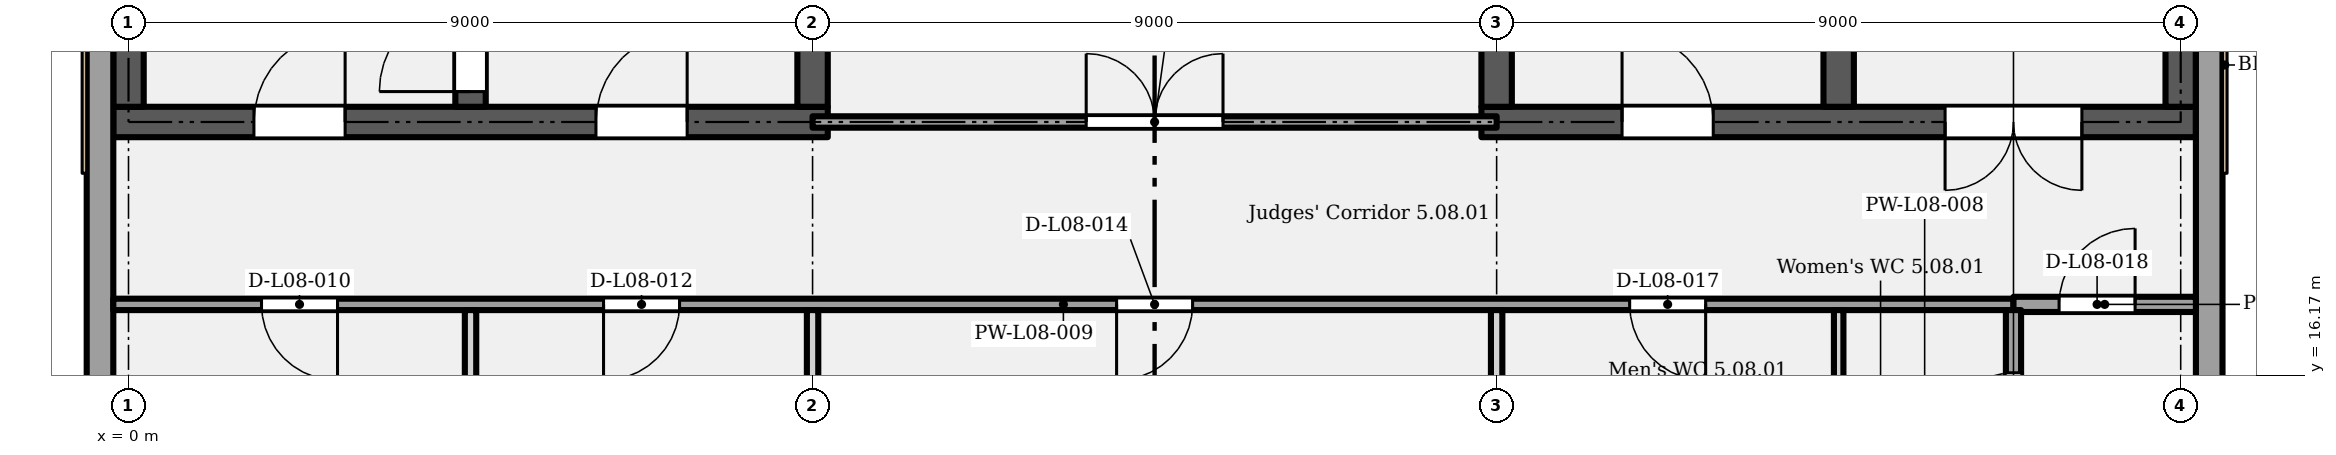
"""IFC4 building model, lengths in metres.
Left out: names, types, materials, properties, quantities, classifications, styles, units other than length and angle.
Written with IfcOpenShell. Run it as: python <this file> out.ifc"""

import sys

from ifc_helpers import new_model, si_unit, direction, frame, frame_2d, origin, place, context, subcontext, project, spatial, rectangle, extrude, element, fill, save


model = new_model("IFC4")
c1 = context("Model", 3, precision=1e-05, world=origin(), true_north=direction((0.0, 1.0)))
c2 = subcontext(c1, "Body", "Model", "MODEL_VIEW")
j1 = project(units=[si_unit("LENGTHUNIT", "METRE"), si_unit("PLANEANGLEUNIT", "RADIAN")], contexts=[c1])
p1 = place(None, origin())
s1 = spatial("IfcSite", under=j1, at=p1, CompositionType="ELEMENT")
p2 = place(p1, origin())
s2 = spatial("IfcBuilding", under=s1, at=p2, CompositionType="ELEMENT")
p3 = place(p2, frame((0.0, 0.0, 44.4)))
s3 = spatial("IfcBuildingStorey", under=s2, at=p3, CompositionType="ELEMENT", Elevation=44.4)
p4 = place(p3, frame((-0.2, 19.5, 0.0), z_axis=(0.0, 0.0, 1.0), x_axis=(1.0, 0.0, 0.0)))
e1 = element("IfcWall", 1, at=p4, inside=s3, PredefinedType="SHEAR", context=c2, shape_type="SweptSolid", body=[
    extrude(rectangle(XDim=9.4, YDim=0.4, at=frame_2d((4.7, 0.0))), origin(), (0.0, 0.0, 1.0), 4.25),
])
p5 = place(p4, frame((1.85, 0.0, 0.0)))
e2 = element("IfcOpeningElement", 2, at=p5, cuts=e1, PredefinedType="OPENING", context=c2, shape_type="SweptSolid", body=[
    extrude(rectangle(XDim=1.2, YDim=2.1, at=frame_2d((0.6, 1.05))), frame((0.0, 0.21, 0.0), z_axis=(0.0, -1.0, 0.0), x_axis=(1.0, 0.0, 0.0)), (0.0, 0.0, 1.0), 0.42),
])
p6 = place(p4, frame((6.35, 0.0, 0.0)))
e3 = element("IfcOpeningElement", 3, at=p6, cuts=e1, PredefinedType="OPENING", context=c2, shape_type="SweptSolid", body=[
    extrude(rectangle(XDim=1.2, YDim=2.1, at=frame_2d((0.6, 1.05))), frame((0.0, 0.21, 0.0), z_axis=(0.0, -1.0, 0.0), x_axis=(1.0, 0.0, 0.0)), (0.0, 0.0, 1.0), 0.42),
])
p7 = place(p3, frame((17.8, 19.5, 0.0), z_axis=(0.0, 0.0, 1.0), x_axis=(1.0, 0.0, 0.0)))
e4 = element("IfcWall", 4, at=p7, inside=s3, PredefinedType="SHEAR", context=c2, shape_type="SweptSolid", body=[
    extrude(rectangle(XDim=9.4, YDim=0.4, at=frame_2d((4.7, 0.0))), origin(), (0.0, 0.0, 1.0), 4.25),
])
p8 = place(p7, frame((1.85, 0.0, 0.0)))
e5 = element("IfcOpeningElement", 5, at=p8, cuts=e4, PredefinedType="OPENING", context=c2, shape_type="SweptSolid", body=[
    extrude(rectangle(XDim=1.2, YDim=2.1, at=frame_2d((0.6, 1.05))), frame((0.0, 0.21, 0.0), z_axis=(0.0, -1.0, 0.0), x_axis=(1.0, 0.0, 0.0)), (0.0, 0.0, 1.0), 0.42),
])
p9 = place(p7, frame((7.9, 0.0, 0.0), z_axis=(0.0, 0.0, 1.0), x_axis=(-1.0, 0.0, 0.0)))
e6 = element("IfcOpeningElement", 6, at=p9, cuts=e4, PredefinedType="OPENING", context=c2, shape_type="SweptSolid", body=[
    extrude(rectangle(XDim=1.8, YDim=2.1, at=frame_2d((0.9, 1.05))), frame((0.0, 0.21, 0.0), z_axis=(0.0, -1.0, 0.0), x_axis=(1.0, 0.0, 0.0)), (0.0, 0.0, 1.0), 0.42),
])
p10 = place(p3, frame((0.0, 19.7, 0.0), z_axis=(0.0, 0.0, 1.0), x_axis=(0.0, 1.0, 0.0)))
e7 = element("IfcWall", 7, at=p10, inside=s3, PredefinedType="SHEAR", context=c2, shape_type="SweptSolid", body=[
    extrude(rectangle(XDim=8.35, YDim=0.4, at=frame_2d((4.175, 0.0))), origin(), (0.0, 0.0, 1.0), 4.25),
])
p11 = place(p3, frame((4.5, 19.7, 0.0), z_axis=(0.0, 0.0, 1.0), x_axis=(0.0, 1.0, 0.0)))
e8 = element("IfcWall", 8, at=p11, inside=s3, PredefinedType="SHEAR", context=c2, shape_type="SweptSolid", body=[
    extrude(rectangle(XDim=8.6, YDim=0.4, at=frame_2d((4.3, 0.0))), origin(), (0.0, 0.0, 1.0), 4.25),
])
p12 = place(p11, frame((0.2, 0.0, 0.0)))
e9 = element("IfcOpeningElement", 9, at=p12, cuts=e8, PredefinedType="OPENING", context=c2, shape_type="SweptSolid", body=[
    extrude(rectangle(XDim=1.2, YDim=2.1, at=frame_2d((0.6, 1.05))), frame((0.0, 0.21, 0.0), z_axis=(0.0, -1.0, 0.0), x_axis=(1.0, 0.0, 0.0)), (0.0, 0.0, 1.0), 0.42),
])
for number, where, z_axis, x_axis in (
    (10, (9.0, 19.7, 0.0), (0.0, 0.0, 1.0), (0.0, 1.0, 0.0)),
    (11, (18.0, 19.7, 0.0), (0.0, 0.0, 1.0), (0.0, 1.0, 0.0)),
):
    element("IfcWall", number, at=place(p3, frame(where, z_axis=z_axis, x_axis=x_axis)), inside=s3, PredefinedType="SHEAR", context=c2, shape_type="SweptSolid", body=[
        extrude(rectangle(XDim=8.35, YDim=0.4, at=frame_2d((4.175, 0.0))), origin(), (0.0, 0.0, 1.0), 4.25),
    ])
p13 = place(p3, frame((22.5, 19.7, 0.0), z_axis=(0.0, 0.0, 1.0), x_axis=(0.0, 1.0, 0.0)))
e12 = element("IfcWall", 12, at=p13, inside=s3, PredefinedType="SHEAR", context=c2, shape_type="SweptSolid", body=[
    extrude(rectangle(XDim=8.6, YDim=0.4, at=frame_2d((4.3, 0.0))), origin(), (0.0, 0.0, 1.0), 4.25),
])
p14 = place(p3, frame((27.0, 19.7, 0.0), z_axis=(0.0, 0.0, 1.0), x_axis=(0.0, 1.0, 0.0)))
e13 = element("IfcWall", 13, at=p14, inside=s3, PredefinedType="SHEAR", context=c2, shape_type="SweptSolid", body=[
    extrude(rectangle(XDim=8.35, YDim=0.4, at=frame_2d((4.175, 0.0))), origin(), (0.0, 0.0, 1.0), 4.25),
])
p15 = place(p3, frame((27.375, 15.188, 0.0), z_axis=(0.0, 0.0, 1.0), x_axis=(0.0, 1.0, 0.0)))
e14 = element("IfcWall", 14, at=p15, inside=s3, PredefinedType="SOLIDWALL", context=c2, shape_type="SweptSolid", body=[
    extrude(rectangle(XDim=12.863, YDim=0.35, at=frame_2d((6.431, 0.0))), origin(), (0.0, 0.0, 1.0), 4.25),
])
p16 = place(p3, frame((-0.375, 14.325, 0.0), z_axis=(0.0, 0.0, 1.0), x_axis=(0.0, 1.0, 0.0)))
e15 = element("IfcWall", 15, at=p16, inside=s3, PredefinedType="SOLIDWALL", context=c2, shape_type="SweptSolid", body=[
    extrude(rectangle(XDim=13.725, YDim=0.35, at=frame_2d((6.863, 0.0))), origin(), (0.0, 0.0, 1.0), 4.25),
])
p17 = place(p3, frame((-0.2, 17.1, 0.0), z_axis=(0.0, 0.0, 1.0), x_axis=(1.0, 0.0, 0.0)))
e16 = element("IfcWall", 16, at=p17, inside=s3, PredefinedType="PARTITIONING", context=c2, shape_type="SweptSolid", body=[
    extrude(rectangle(XDim=25.0, YDim=0.15, at=frame_2d((12.5, 0.0))), origin(), (0.0, 0.0, 1.0), 4.25),
])
p18 = place(p17, frame((2.95, 0.0, 0.0), z_axis=(0.0, 0.0, 1.0), x_axis=(-1.0, 0.0, 0.0)))
e17 = element("IfcOpeningElement", 17, at=p18, cuts=e16, PredefinedType="OPENING", context=c2, shape_type="SweptSolid", body=[
    extrude(rectangle(XDim=1.0, YDim=2.1, at=frame_2d((0.5, 1.05))), frame((0.0, 0.085, 0.0), z_axis=(0.0, -1.0, 0.0), x_axis=(1.0, 0.0, 0.0)), (0.0, 0.0, 1.0), 0.17),
])
p19 = place(p17, frame((7.45, 0.0, 0.0), z_axis=(0.0, 0.0, 1.0), x_axis=(-1.0, 0.0, 0.0)))
e18 = element("IfcOpeningElement", 18, at=p19, cuts=e16, PredefinedType="OPENING", context=c2, shape_type="SweptSolid", body=[
    extrude(rectangle(XDim=1.0, YDim=2.1, at=frame_2d((0.5, 1.05))), frame((0.0, 0.085, 0.0), z_axis=(0.0, -1.0, 0.0), x_axis=(1.0, 0.0, 0.0)), (0.0, 0.0, 1.0), 0.17),
])
p20 = place(p17, frame((14.2, 0.0, 0.0), z_axis=(0.0, 0.0, 1.0), x_axis=(-1.0, 0.0, 0.0)))
e19 = element("IfcOpeningElement", 19, at=p20, cuts=e16, PredefinedType="OPENING", context=c2, shape_type="SweptSolid", body=[
    extrude(rectangle(XDim=1.0, YDim=2.1, at=frame_2d((0.5, 1.05))), frame((0.0, 0.085, 0.0), z_axis=(0.0, -1.0, 0.0), x_axis=(1.0, 0.0, 0.0)), (0.0, 0.0, 1.0), 0.17),
])
p21 = place(p17, frame((20.95, 0.0, 0.0), z_axis=(0.0, 0.0, 1.0), x_axis=(-1.0, 0.0, 0.0)))
e20 = element("IfcOpeningElement", 20, at=p21, cuts=e16, PredefinedType="OPENING", context=c2, shape_type="SweptSolid", body=[
    extrude(rectangle(XDim=1.0, YDim=2.1, at=frame_2d((0.5, 1.05))), frame((0.0, 0.085, 0.0), z_axis=(0.0, -1.0, 0.0), x_axis=(1.0, 0.0, 0.0)), (0.0, 0.0, 1.0), 0.17),
])
p22 = place(p3, frame((24.8, 17.1, 0.0), z_axis=(0.0, 0.0, 1.0), x_axis=(1.0, 0.0, 0.0)))
e21 = element("IfcWall", 21, at=p22, inside=s3, PredefinedType="PARTITIONING", context=c2, shape_type="SweptSolid", body=[
    extrude(rectangle(XDim=2.4, YDim=0.2, at=frame_2d((1.2, 0.0))), origin(), (0.0, 0.0, 1.0), 4.25),
])
p23 = place(p22, frame((0.6, 0.0, 0.0)))
e22 = element("IfcOpeningElement", 22, at=p23, cuts=e21, PredefinedType="OPENING", context=c2, shape_type="SweptSolid", body=[
    extrude(rectangle(XDim=1.0, YDim=2.1, at=frame_2d((0.5, 1.05))), frame((0.0, 0.11, 0.0), z_axis=(0.0, -1.0, 0.0), x_axis=(1.0, 0.0, 0.0)), (0.0, 0.0, 1.0), 0.22),
])
p24 = place(p3, frame((9.0, 19.5, 0.0), z_axis=(0.0, 0.0, 1.0), x_axis=(1.0, 0.0, 0.0)))
e23 = element("IfcWall", 23, at=p24, inside=s3, PredefinedType="PARTITIONING", context=c2, shape_type="SweptSolid", body=[
    extrude(rectangle(XDim=9.0, YDim=0.15, at=frame_2d((4.5, 0.0))), origin(), (0.0, 0.0, 1.0), 4.25),
])
p25 = place(p24, frame((3.6, 0.0, 0.0)))
e24 = element("IfcOpeningElement", 24, at=p25, cuts=e23, PredefinedType="OPENING", context=c2, shape_type="SweptSolid", body=[
    extrude(rectangle(XDim=1.8, YDim=2.1, at=frame_2d((0.9, 1.05))), frame((0.0, 0.085, 0.0), z_axis=(0.0, -1.0, 0.0), x_axis=(1.0, 0.0, 0.0)), (0.0, 0.0, 1.0), 0.17),
])
p26 = place(p3, frame((4.5, 12.0, 0.0), z_axis=(0.0, 0.0, 1.0), x_axis=(0.0, 1.0, 0.0)))
e25 = element("IfcWall", 25, at=p26, inside=s3, PredefinedType="PARTITIONING", context=c2, shape_type="SweptSolid", body=[
    extrude(rectangle(XDim=5.025, YDim=0.15, at=frame_2d((2.512, 0.0))), origin(), (0.0, 0.0, 1.0), 4.25),
])
for number, where, z_axis, x_axis in (
    (26, (9.0, 12.45, 0.0), (0.0, 0.0, 1.0), (0.0, 1.0, 0.0)),
    (27, (18.0, 12.45, 0.0), (0.0, 0.0, 1.0), (0.0, 1.0, 0.0)),
):
    element("IfcWall", number, at=place(p3, frame(where, z_axis=z_axis, x_axis=x_axis)), inside=s3, PredefinedType="PARTITIONING", context=c2, shape_type="SweptSolid", body=[
        extrude(rectangle(XDim=4.575, YDim=0.15, at=frame_2d((2.288, 0.0))), origin(), (0.0, 0.0, 1.0), 3.3),
    ])
p27 = place(p3, frame((22.5, 9.062, 0.0), z_axis=(0.0, 0.0, 1.0), x_axis=(0.0, 1.0, 0.0)))
e28 = element("IfcWall", 28, at=p27, inside=s3, PredefinedType="PARTITIONING", context=c2, shape_type="SweptSolid", body=[
    extrude(rectangle(XDim=7.962, YDim=0.125, at=frame_2d((3.981, 0.0))), origin(), (0.0, 0.0, 1.0), 4.25),
])
p28 = place(p3, frame((24.8, 9.062, 0.0), z_axis=(0.0, 0.0, 1.0), x_axis=(0.0, 1.0, 0.0)))
e29 = element("IfcWall", 29, at=p28, inside=s3, PredefinedType="PARTITIONING", context=c2, shape_type="SweptSolid", body=[
    extrude(rectangle(XDim=7.962, YDim=0.2, at=frame_2d((3.981, 0.0))), origin(), (0.0, 0.0, 1.0), 4.25),
])
p29 = place(p28, frame((6.238, 0.0, 0.0)))
e30 = element("IfcOpeningElement", 30, at=p29, cuts=e29, PredefinedType="OPENING", context=c2, shape_type="SweptSolid", body=[
    extrude(rectangle(XDim=0.9, YDim=2.1, at=frame_2d((0.45, 1.05))), frame((0.0, 0.11, 0.0), z_axis=(0.0, -1.0, 0.0), x_axis=(1.0, 0.0, 0.0)), (0.0, 0.0, 1.0), 0.22),
])
p30 = place(p28, frame((3.538, 0.0, 0.0)))
e31 = element("IfcOpeningElement", 31, at=p30, cuts=e29, PredefinedType="OPENING", context=c2, shape_type="SweptSolid", body=[
    extrude(rectangle(XDim=0.9, YDim=2.1, at=frame_2d((0.45, 1.05))), frame((0.0, 0.11, 0.0), z_axis=(0.0, -1.0, 0.0), x_axis=(1.0, 0.0, 0.0)), (0.0, 0.0, 1.0), 0.22),
])
p31 = place(p28, frame((0.788, 0.0, 0.0)))
e32 = element("IfcOpeningElement", 32, at=p31, cuts=e29, PredefinedType="OPENING", context=c2, shape_type="SweptSolid", body=[
    extrude(rectangle(XDim=1.0, YDim=2.1, at=frame_2d((0.5, 1.05))), frame((0.0, 0.11, 0.0), z_axis=(0.0, -1.0, 0.0), x_axis=(1.0, 0.0, 0.0)), (0.0, 0.0, 1.0), 0.22),
])
p32 = place(p5, origin())
e33 = element("IfcDoor", 33, at=p32, inside=s3, OperationType="SINGLE_SWING_RIGHT", PredefinedType="DOOR", context=c2, shape_type="SweptSolid", body=[
    extrude(rectangle(XDim=1.2, YDim=2.1, at=frame_2d((0.6, 1.05))), frame((0.0, 0.025, 0.0), z_axis=(0.0, -1.0, 0.0), x_axis=(1.0, 0.0, 0.0)), (0.0, 0.0, 1.0), 0.05),
])
fill(e2, e33)
p33 = place(p12, origin())
e34 = element("IfcDoor", 34, at=p33, inside=s3, OperationType="SINGLE_SWING_LEFT", PredefinedType="DOOR", context=c2, shape_type="SweptSolid", body=[
    extrude(rectangle(XDim=1.2, YDim=2.1, at=frame_2d((0.6, 1.05))), frame((0.0, 0.025, 0.0), z_axis=(0.0, -1.0, 0.0), x_axis=(1.0, 0.0, 0.0)), (0.0, 0.0, 1.0), 0.05),
])
fill(e9, e34)
p34 = place(p6, origin())
e35 = element("IfcDoor", 35, at=p34, inside=s3, OperationType="SINGLE_SWING_RIGHT", PredefinedType="DOOR", context=c2, shape_type="SweptSolid", body=[
    extrude(rectangle(XDim=1.2, YDim=2.1, at=frame_2d((0.6, 1.05))), frame((0.0, 0.025, 0.0), z_axis=(0.0, -1.0, 0.0), x_axis=(1.0, 0.0, 0.0)), (0.0, 0.0, 1.0), 0.05),
])
fill(e3, e35)
p35 = place(p8, origin())
e36 = element("IfcDoor", 36, at=p35, inside=s3, OperationType="SINGLE_SWING_LEFT", PredefinedType="DOOR", context=c2, shape_type="SweptSolid", body=[
    extrude(rectangle(XDim=1.2, YDim=2.1, at=frame_2d((0.6, 1.05))), frame((0.0, 0.025, 0.0), z_axis=(0.0, -1.0, 0.0), x_axis=(1.0, 0.0, 0.0)), (0.0, 0.0, 1.0), 0.05),
])
fill(e5, e36)
p36 = place(p9, origin())
e37 = element("IfcDoor", 37, at=p36, inside=s3, OperationType="DOUBLE_DOOR_SINGLE_SWING", PredefinedType="DOOR", context=c2, shape_type="SweptSolid", body=[
    extrude(rectangle(XDim=1.8, YDim=2.1, at=frame_2d((0.9, 1.05))), frame((0.0, 0.025, 0.0), z_axis=(0.0, -1.0, 0.0), x_axis=(1.0, 0.0, 0.0)), (0.0, 0.0, 1.0), 0.05),
])
fill(e6, e37)
p37 = place(p18, origin())
e38 = element("IfcDoor", 38, at=p37, inside=s3, OperationType="SINGLE_SWING_LEFT", PredefinedType="DOOR", context=c2, shape_type="SweptSolid", body=[
    extrude(rectangle(XDim=1.0, YDim=2.1, at=frame_2d((0.5, 1.05))), frame((0.0, 0.025, 0.0), z_axis=(0.0, -1.0, 0.0), x_axis=(1.0, 0.0, 0.0)), (0.0, 0.0, 1.0), 0.05),
])
fill(e17, e38)
p38 = place(p19, origin())
e39 = element("IfcDoor", 39, at=p38, inside=s3, OperationType="SINGLE_SWING_RIGHT", PredefinedType="DOOR", context=c2, shape_type="SweptSolid", body=[
    extrude(rectangle(XDim=1.0, YDim=2.1, at=frame_2d((0.5, 1.05))), frame((0.0, 0.025, 0.0), z_axis=(0.0, -1.0, 0.0), x_axis=(1.0, 0.0, 0.0)), (0.0, 0.0, 1.0), 0.05),
])
fill(e18, e39)
p39 = place(p20, origin())
e40 = element("IfcDoor", 40, at=p39, inside=s3, OperationType="SINGLE_SWING_RIGHT", PredefinedType="DOOR", context=c2, shape_type="SweptSolid", body=[
    extrude(rectangle(XDim=1.0, YDim=2.1, at=frame_2d((0.5, 1.05))), frame((0.0, 0.025, 0.0), z_axis=(0.0, -1.0, 0.0), x_axis=(1.0, 0.0, 0.0)), (0.0, 0.0, 1.0), 0.05),
])
fill(e19, e40)
p40 = place(p25, origin())
e41 = element("IfcDoor", 41, at=p40, inside=s3, OperationType="DOUBLE_DOOR_SINGLE_SWING", PredefinedType="DOOR", context=c2, shape_type="SweptSolid", body=[
    extrude(rectangle(XDim=1.8, YDim=2.1, at=frame_2d((0.9, 1.05))), frame((0.0, 0.025, 0.0), z_axis=(0.0, -1.0, 0.0), x_axis=(1.0, 0.0, 0.0)), (0.0, 0.0, 1.0), 0.05),
])
fill(e24, e41)
p41 = place(p21, origin())
e42 = element("IfcDoor", 42, at=p41, inside=s3, OperationType="SINGLE_SWING_LEFT", PredefinedType="DOOR", context=c2, shape_type="SweptSolid", body=[
    extrude(rectangle(XDim=1.0, YDim=2.1, at=frame_2d((0.5, 1.05))), frame((0.0, 0.025, 0.0), z_axis=(0.0, -1.0, 0.0), x_axis=(1.0, 0.0, 0.0)), (0.0, 0.0, 1.0), 0.05),
])
fill(e20, e42)
p42 = place(p23, origin())
e43 = element("IfcDoor", 43, at=p42, inside=s3, OperationType="SINGLE_SWING_RIGHT", PredefinedType="DOOR", context=c2, shape_type="SweptSolid", body=[
    extrude(rectangle(XDim=1.0, YDim=2.1, at=frame_2d((0.5, 1.05))), frame((0.0, 0.025, 0.0), z_axis=(0.0, -1.0, 0.0), x_axis=(1.0, 0.0, 0.0)), (0.0, 0.0, 1.0), 0.05),
])
fill(e22, e43)
p43 = place(p29, origin())
e44 = element("IfcDoor", 44, at=p43, inside=s3, OperationType="SINGLE_SWING_LEFT", PredefinedType="DOOR", context=c2, shape_type="SweptSolid", body=[
    extrude(rectangle(XDim=0.9, YDim=2.1, at=frame_2d((0.45, 1.05))), frame((0.0, 0.025, 0.0), z_axis=(0.0, -1.0, 0.0), x_axis=(1.0, 0.0, 0.0)), (0.0, 0.0, 1.0), 0.05),
])
fill(e30, e44)
save(model, sys.argv[1])
